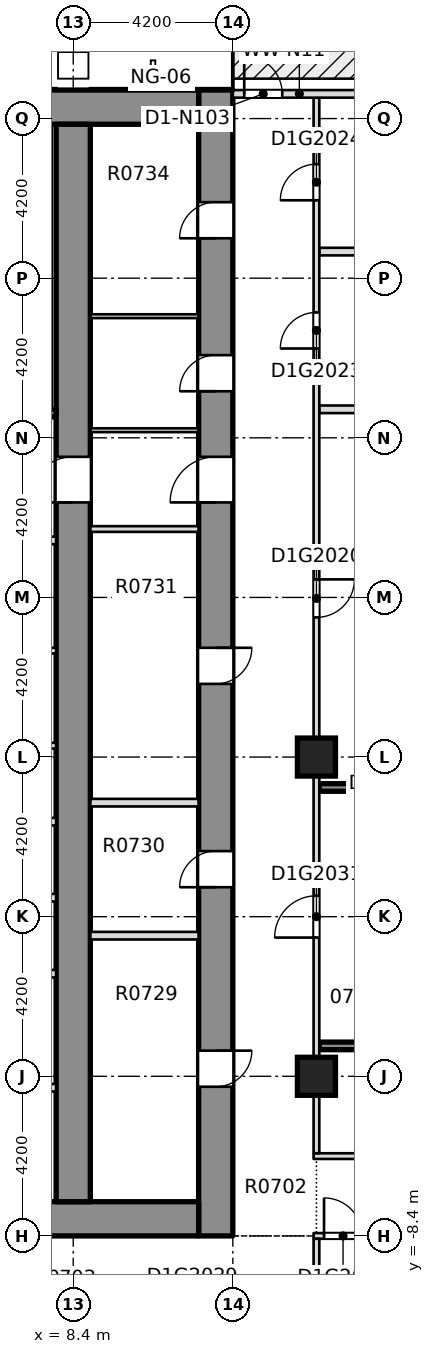
"""IFC4 building model, lengths in metres.
Left out: names, types, materials, properties, quantities, classifications, styles, units other than length and angle.
Written with IfcOpenShell. Run it as: python <this file> out.ifc"""

import sys

from ifc_helpers import new_model, si_unit, direction, frame, frame_2d, origin, origin_2d, place, context, subcontext, project, spatial, rectangle, extrude, element, fill, save


model = new_model("IFC4")
c1 = context("Model", 3, precision=1e-05, world=origin(), true_north=direction((0.0, 1.0)))
c2 = subcontext(c1, "Body", "Model", "MODEL_VIEW")
j1 = project(units=[si_unit("LENGTHUNIT", "METRE"), si_unit("PLANEANGLEUNIT", "RADIAN")], contexts=[c1])
p1 = place(None, origin())
s1 = spatial("IfcSite", under=j1, at=p1, CompositionType="ELEMENT")
p2 = place(p1, origin())
s2 = spatial("IfcBuilding", under=s1, at=p2, CompositionType="ELEMENT")
p3 = place(p2, frame((0.0, 0.0, 37.95)))
s3 = spatial("IfcBuildingStorey", under=s2, at=p3, CompositionType="ELEMENT", Elevation=37.95)
p4 = place(p3, frame((12.15, -8.4, -0.32), z_axis=(0.0, 0.0, 1.0), x_axis=(0.0, 1.0, 0.0)))
e1 = element("IfcWall", 1, at=p4, inside=s3, PredefinedType="SHEAR", context=c2, shape_type="SweptSolid", body=[
    extrude(rectangle(XDim=30.15, YDim=0.9, at=frame_2d((15.075, 0.0))), origin(), (0.0, 0.0, 1.0), 3.45),
])
p5 = place(p4, frame((3.925, 0.0, 0.32)))
e2 = element("IfcOpeningElement", 2, at=p5, cuts=e1, PredefinedType="OPENING", context=c2, shape_type="SweptSolid", body=[
    extrude(rectangle(XDim=0.95, YDim=2.1, at=frame_2d((0.475, 1.05))), frame((0.0, 0.46, 0.0), z_axis=(0.0, -1.0, 0.0), x_axis=(1.0, 0.0, 0.0)), (0.0, 0.0, 1.0), 0.92),
])
p6 = place(p4, frame((9.175, 0.0, 0.32)))
e3 = element("IfcOpeningElement", 3, at=p6, cuts=e1, PredefinedType="OPENING", context=c2, shape_type="SweptSolid", body=[
    extrude(rectangle(XDim=0.95, YDim=2.1, at=frame_2d((0.475, 1.05))), frame((0.0, 0.46, 0.0), z_axis=(0.0, -1.0, 0.0), x_axis=(1.0, 0.0, 0.0)), (0.0, 0.0, 1.0), 0.92),
])
p7 = place(p4, frame((14.525, 0.0, 0.32)))
e4 = element("IfcOpeningElement", 4, at=p7, cuts=e1, PredefinedType="OPENING", context=c2, shape_type="SweptSolid", body=[
    extrude(rectangle(XDim=0.95, YDim=2.1, at=frame_2d((0.475, 1.05))), frame((0.0, 0.46, 0.0), z_axis=(0.0, -1.0, 0.0), x_axis=(1.0, 0.0, 0.0)), (0.0, 0.0, 1.0), 0.92),
])
p8 = place(p4, frame((22.225, 0.0, 0.32)))
e5 = element("IfcOpeningElement", 5, at=p8, cuts=e1, PredefinedType="OPENING", context=c2, shape_type="SweptSolid", body=[
    extrude(rectangle(XDim=0.95, YDim=2.1, at=frame_2d((0.475, 1.05))), frame((0.0, 0.46, 0.0), z_axis=(0.0, -1.0, 0.0), x_axis=(1.0, 0.0, 0.0)), (0.0, 0.0, 1.0), 0.92),
])
p9 = place(p4, frame((26.25, 0.0, 0.32)))
e6 = element("IfcOpeningElement", 6, at=p9, cuts=e1, PredefinedType="OPENING", context=c2, shape_type="SweptSolid", body=[
    extrude(rectangle(XDim=0.95, YDim=2.1, at=frame_2d((0.475, 1.05))), frame((0.0, 0.46, 0.0), z_axis=(0.0, -1.0, 0.0), x_axis=(1.0, 0.0, 0.0)), (0.0, 0.0, 1.0), 0.92),
])
p10 = place(p4, frame((19.3, 0.0, 0.32)))
e7 = element("IfcOpeningElement", 7, at=p10, cuts=e1, PredefinedType="OPENING", context=c2, shape_type="SweptSolid", body=[
    extrude(rectangle(XDim=1.2, YDim=2.1, at=frame_2d((0.6, 1.05))), frame((0.0, 0.46, 0.0), z_axis=(0.0, -1.0, 0.0), x_axis=(1.0, 0.0, 0.0)), (0.0, 0.0, 1.0), 0.92),
])
p11 = place(p3, frame((-11.7, -7.95, -0.32), z_axis=(0.0, 0.0, 1.0), x_axis=(1.0, 0.0, 0.0)))
e8 = element("IfcWall", 8, at=p11, inside=s3, PredefinedType="SHEAR", context=c2, shape_type="SweptSolid", body=[
    extrude(rectangle(XDim=23.4, YDim=0.9, at=frame_2d((11.7, 0.0))), origin(), (0.0, 0.0, 1.0), 3.45),
])
p12 = place(p11, frame((6.95, 0.0, 0.32)))
e9 = element("IfcOpeningElement", 9, at=p12, cuts=e8, PredefinedType="OPENING", context=c2, shape_type="SweptSolid", body=[
    extrude(rectangle(XDim=1.8, YDim=2.1, at=frame_2d((0.9, 1.05))), frame((0.0, 0.46, 0.0), z_axis=(0.0, -1.0, 0.0), x_axis=(1.0, 0.0, 0.0)), (0.0, 0.0, 1.0), 0.92),
])
p13 = place(p11, frame((14.65, 0.0, 0.32)))
e10 = element("IfcOpeningElement", 10, at=p13, cuts=e8, PredefinedType="OPENING", context=c2, shape_type="SweptSolid", body=[
    extrude(rectangle(XDim=1.8, YDim=2.1, at=frame_2d((0.9, 1.05))), frame((0.0, 0.46, 0.0), z_axis=(0.0, -1.0, 0.0), x_axis=(1.0, 0.0, 0.0)), (0.0, 0.0, 1.0), 0.92),
])
p14 = place(p3, frame((-11.7, 21.3, -0.32), z_axis=(0.0, 0.0, 1.0), x_axis=(1.0, 0.0, 0.0)))
e11 = element("IfcWall", 11, at=p14, inside=s3, PredefinedType="SOLIDWALL", context=c2, shape_type="SweptSolid", body=[
    extrude(rectangle(XDim=23.4, YDim=0.9, at=frame_2d((11.7, 0.0))), origin(), (0.0, 0.0, 1.0), 3.45),
])
p15 = place(p3, frame((8.4, -7.5, -0.32), z_axis=(0.0, 0.0, 1.0), x_axis=(0.0, 1.0, 0.0)))
e12 = element("IfcWall", 12, at=p15, inside=s3, PredefinedType="SHEAR", context=c2, shape_type="SweptSolid", body=[
    extrude(rectangle(XDim=28.35, YDim=0.9, at=frame_2d((14.175, 0.0))), origin(), (0.0, 0.0, 1.0), 3.45),
])
p16 = place(p15, frame((18.4, 0.0, 0.32)))
e13 = element("IfcOpeningElement", 13, at=p16, cuts=e12, PredefinedType="OPENING", context=c2, shape_type="SweptSolid", body=[
    extrude(rectangle(XDim=1.2, YDim=2.1, at=frame_2d((0.6, 1.05))), frame((0.0, 0.46, 0.0), z_axis=(0.0, -1.0, 0.0), x_axis=(1.0, 0.0, 0.0)), (0.0, 0.0, 1.0), 0.92),
])
for number, where, z_axis, x_axis in (
    (14, (14.8, -4.2, -0.32), (0.0, 0.0, 1.0), (1.0, 0.0, 0.0)),
    (15, (14.8, 4.2, -0.32), (0.0, 0.0, 1.0), (1.0, 0.0, 0.0)),
):
    element("IfcColumn", number, at=place(p3, frame(where, z_axis=z_axis, x_axis=x_axis)), inside=s3, PredefinedType="COLUMN", context=c2, shape_type="SweptSolid", body=[
        extrude(rectangle(XDim=1.0, YDim=1.0, at=origin_2d()), origin(), (0.0, 0.0, 1.0), 3.45),
    ])
p17 = place(p3, frame((14.725, -8.4, 0.0), z_axis=(0.0, 0.0, 1.0), x_axis=(1.0, 0.0, 0.0)))
e16 = element("IfcWall", 16, at=p17, inside=s3, PredefinedType="PARTITIONING", context=c2, shape_type="SweptSolid", body=[
    extrude(rectangle(XDim=11.025, YDim=0.15, at=frame_2d((5.512, 0.0))), origin(), (0.0, 0.0, 1.0), 3.13),
])
p18 = place(p17, frame((0.275, 0.0, 0.0)))
e17 = element("IfcOpeningElement", 17, at=p18, cuts=e16, PredefinedType="OPENING", context=c2, shape_type="SweptSolid", body=[
    extrude(rectangle(XDim=1.0, YDim=2.1, at=frame_2d((0.5, 1.05))), frame((0.0, 0.085, 0.0), z_axis=(0.0, -1.0, 0.0), x_axis=(1.0, 0.0, 0.0)), (0.0, 0.0, 1.0), 0.17),
])
p19 = place(p3, frame((14.725, -6.3, 0.0), z_axis=(0.0, 0.0, 1.0), x_axis=(1.0, 0.0, 0.0)))
e18 = element("IfcWall", 18, at=p19, inside=s3, PredefinedType="PARTITIONING", context=c2, shape_type="SweptSolid", body=[
    extrude(rectangle(XDim=11.025, YDim=0.15, at=frame_2d((5.512, 0.0))), origin(), (0.0, 0.0, 1.0), 3.13),
])
p20 = place(p19, frame((5.15, 0.0, 0.0)))
e19 = element("IfcOpeningElement", 19, at=p20, cuts=e18, PredefinedType="OPENING", context=c2, shape_type="SweptSolid", body=[
    extrude(rectangle(XDim=1.0, YDim=2.1, at=frame_2d((0.5, 1.05))), frame((0.0, 0.085, 0.0), z_axis=(0.0, -1.0, 0.0), x_axis=(1.0, 0.0, 0.0)), (0.0, 0.0, 1.0), 0.17),
])
p21 = place(p3, frame((14.875, -3.4, 0.0), z_axis=(0.0, 0.0, 1.0), x_axis=(1.0, 0.0, 0.0)))
e20 = element("IfcWall", 20, at=p21, inside=s3, PredefinedType="SOLIDWALL", context=c2, shape_type="SweptSolid", body=[
    extrude(rectangle(XDim=5.525, YDim=0.2, at=frame_2d((2.762, 0.0))), origin(), (0.0, 0.0, 1.0), 3.13),
])
p22 = place(p3, frame((14.875, 3.4, 0.0), z_axis=(0.0, 0.0, 1.0), x_axis=(1.0, 0.0, 0.0)))
e21 = element("IfcWall", 21, at=p22, inside=s3, PredefinedType="SOLIDWALL", context=c2, shape_type="SweptSolid", body=[
    extrude(rectangle(XDim=5.575, YDim=0.2, at=frame_2d((2.788, 0.0))), origin(), (0.0, 0.0, 1.0), 3.13),
])
for number, where, z_axis, x_axis in (
    (22, (14.875, 13.35, 0.0), (0.0, 0.0, 1.0), (1.0, 0.0, 0.0)),
    (23, (14.875, 17.5, 0.0), (0.0, 0.0, 1.0), (1.0, 0.0, 0.0)),
):
    element("IfcWall", number, at=place(p3, frame(where, z_axis=z_axis, x_axis=x_axis)), inside=s3, PredefinedType="PARTITIONING", context=c2, shape_type="SweptSolid", body=[
        extrude(rectangle(XDim=2.475, YDim=0.2, at=frame_2d((1.238, 0.0))), origin(), (0.0, 0.0, 1.0), 3.13),
    ])
p23 = place(p3, frame((14.8, -10.525, 0.0), z_axis=(0.0, 0.0, 1.0), x_axis=(0.0, 1.0, 0.0)))
e24 = element("IfcWall", 24, at=p23, inside=s3, PredefinedType="PARTITIONING", context=c2, shape_type="SweptSolid", body=[
    extrude(rectangle(XDim=2.05, YDim=0.15, at=frame_2d((1.025, 0.0))), origin(), (0.0, 0.0, 1.0), 3.13),
])
p24 = place(p3, frame((14.8, -6.225, 0.0), z_axis=(0.0, 0.0, 1.0), x_axis=(0.0, 1.0, 0.0)))
e25 = element("IfcWall", 25, at=p24, inside=s3, PredefinedType="PARTITIONING", context=c2, shape_type="SweptSolid", body=[
    extrude(rectangle(XDim=27.775, YDim=0.15, at=frame_2d((13.888, 0.0))), origin(), (0.0, 0.0, 1.0), 3.13),
])
p25 = place(p24, frame((14.1, 0.0, 0.0)))
e26 = element("IfcOpeningElement", 26, at=p25, cuts=e25, PredefinedType="OPENING", context=c2, shape_type="SweptSolid", body=[
    extrude(rectangle(XDim=1.0, YDim=2.1, at=frame_2d((0.5, 1.05))), frame((0.0, 0.085, 0.0), z_axis=(0.0, -1.0, 0.0), x_axis=(1.0, 0.0, 0.0)), (0.0, 0.0, 1.0), 0.17),
])
p26 = place(p24, frame((21.175, 0.0, 0.0)))
e27 = element("IfcOpeningElement", 27, at=p26, cuts=e25, PredefinedType="OPENING", context=c2, shape_type="SweptSolid", body=[
    extrude(rectangle(XDim=0.95, YDim=2.1, at=frame_2d((0.475, 1.05))), frame((0.0, 0.085, 0.0), z_axis=(0.0, -1.0, 0.0), x_axis=(1.0, 0.0, 0.0)), (0.0, 0.0, 1.0), 0.17),
])
p27 = place(p24, frame((25.075, 0.0, 0.0)))
e28 = element("IfcOpeningElement", 28, at=p27, cuts=e25, PredefinedType="OPENING", context=c2, shape_type="SweptSolid", body=[
    extrude(rectangle(XDim=0.95, YDim=2.1, at=frame_2d((0.475, 1.05))), frame((0.0, 0.085, 0.0), z_axis=(0.0, -1.0, 0.0), x_axis=(1.0, 0.0, 0.0)), (0.0, 0.0, 1.0), 0.17),
])
p28 = place(p24, frame((5.675, 0.0, 0.0)))
e29 = element("IfcOpeningElement", 29, at=p28, cuts=e25, PredefinedType="OPENING", context=c2, shape_type="SweptSolid", body=[
    extrude(rectangle(XDim=1.1, YDim=2.1, at=frame_2d((0.55, 1.05))), frame((0.0, 0.085, 0.0), z_axis=(0.0, -1.0, 0.0), x_axis=(1.0, 0.0, 0.0)), (0.0, 0.0, 1.0), 0.17),
])
p29 = place(p3, frame((16.1, 21.65, 0.0), z_axis=(0.0, 0.0, 1.0), x_axis=(-1.0, 0.0, 0.0)))
e30 = element("IfcWall", 30, at=p29, inside=s3, PredefinedType="STANDARD", context=c2, shape_type="SweptSolid", body=[
    extrude(rectangle(XDim=3.5, YDim=0.2, at=frame_2d((1.75, 0.0))), origin(), (0.0, 0.0, 1.0), 3.13),
])
p30 = place(p29, frame((2.2, 0.0, 0.0)))
e31 = element("IfcOpeningElement", 31, at=p30, cuts=e30, PredefinedType="OPENING", context=c2, shape_type="SweptSolid", body=[
    extrude(rectangle(XDim=1.0, YDim=2.4, at=frame_2d((0.5, 1.2))), frame((0.0, 0.11, 0.0), z_axis=(0.0, -1.0, 0.0), x_axis=(1.0, 0.0, 0.0)), (0.0, 0.0, 1.0), 0.22),
])
for number, where, z_axis, x_axis in (
    (32, (5.575, -4.5, 0.0), (0.0, 0.0, 1.0), (1.0, 0.0, 0.0)),
    (33, (5.575, -1.5, 0.0), (0.0, 0.0, 1.0), (1.0, 0.0, 0.0)),
    (34, (5.575, 0.5, 0.0), (0.0, 0.0, 1.0), (1.0, 0.0, 0.0)),
    (35, (5.575, 2.5, 0.0), (0.0, 0.0, 1.0), (1.0, 0.0, 0.0)),
):
    element("IfcWall", number, at=place(p3, frame(where, z_axis=z_axis, x_axis=x_axis)), inside=s3, PredefinedType="PARTITIONING", context=c2, shape_type="SweptSolid", body=[
        extrude(rectangle(XDim=2.374, YDim=0.2, at=frame_2d((1.187, 0.0))), origin(), (0.0, 0.0, 1.0), 3.13),
    ])
p31 = place(p3, frame((5.425, 4.5, 0.0), z_axis=(0.0, 0.0, 1.0), x_axis=(1.0, 0.0, 0.0)))
e36 = element("IfcWall", 36, at=p31, inside=s3, PredefinedType="PARTITIONING", context=c2, shape_type="SweptSolid", body=[
    extrude(rectangle(XDim=2.524, YDim=0.15, at=frame_2d((1.262, 0.0))), origin(), (0.0, 0.0, 1.0), 3.13),
])
p32 = place(p3, frame((-7.949, 7.0, 0.0), z_axis=(0.0, 0.0, 1.0), x_axis=(1.0, 0.0, 0.0)))
e37 = element("IfcWall", 37, at=p32, inside=s3, PredefinedType="PARTITIONING", context=c2, shape_type="SweptSolid", body=[
    extrude(rectangle(XDim=15.898, YDim=0.15, at=frame_2d((7.949, 0.0))), origin(), (0.0, 0.0, 1.0), 3.13),
])
p33 = place(p32, frame((7.249, 0.0, 0.0)))
e38 = element("IfcOpeningElement", 38, at=p33, cuts=e37, PredefinedType="OPENING", context=c2, shape_type="SweptSolid", body=[
    extrude(rectangle(XDim=1.4, YDim=2.1, at=frame_2d((0.7, 1.05))), frame((0.0, 0.085, 0.0), z_axis=(0.0, -1.0, 0.0), x_axis=(1.0, 0.0, 0.0)), (0.0, 0.0, 1.0), 0.17),
])
p34 = place(p3, frame((3.6, 9.9, 0.0), z_axis=(0.0, 0.0, 1.0), x_axis=(1.0, 0.0, 0.0)))
e39 = element("IfcWall", 39, at=p34, inside=s3, PredefinedType="PARTITIONING", context=c2, shape_type="SweptSolid", body=[
    extrude(rectangle(XDim=4.349, YDim=0.2, at=frame_2d((2.174, 0.0))), origin(), (0.0, 0.0, 1.0), 3.13),
])
p35 = place(p34, frame((2.25, 0.0, 0.0)))
e40 = element("IfcOpeningElement", 40, at=p35, cuts=e39, PredefinedType="OPENING", context=c2, shape_type="SweptSolid", body=[
    extrude(rectangle(XDim=1.1, YDim=2.1, at=frame_2d((0.55, 1.05))), frame((0.0, 0.11, 0.0), z_axis=(0.0, -1.0, 0.0), x_axis=(1.0, 0.0, 0.0)), (0.0, 0.0, 1.0), 0.22),
])
p36 = place(p3, frame((3.425, 13.25, 0.0), z_axis=(0.0, 0.0, 1.0), x_axis=(1.0, 0.0, 0.0)))
e41 = element("IfcWall", 41, at=p36, inside=s3, PredefinedType="SOLIDWALL", context=c2, shape_type="SweptSolid", body=[
    extrude(rectangle(XDim=4.524, YDim=0.2, at=frame_2d((2.262, 0.0))), origin(), (0.0, 0.0, 1.0), 3.13),
])
p37 = place(p36, frame((1.825, 0.0, 0.0)))
e42 = element("IfcOpeningElement", 42, at=p37, cuts=e41, PredefinedType="OPENING", context=c2, shape_type="SweptSolid", body=[
    extrude(rectangle(XDim=1.2, YDim=2.1, at=frame_2d((0.6, 1.05))), frame((0.0, 0.11, 0.0), z_axis=(0.0, -1.0, 0.0), x_axis=(1.0, 0.0, 0.0)), (0.0, 0.0, 1.0), 0.22),
])
for number, where, z_axis, x_axis in (
    (43, (8.851, -0.5, 0.0), (0.0, 0.0, 1.0), (1.0, 0.0, 0.0)),
    (44, (8.851, 3.0, 0.0), (0.0, 0.0, 1.0), (1.0, 0.0, 0.0)),
):
    element("IfcWall", number, at=place(p3, frame(where, z_axis=z_axis, x_axis=x_axis)), inside=s3, PredefinedType="PARTITIONING", context=c2, shape_type="SweptSolid", body=[
        extrude(rectangle(XDim=2.848, YDim=0.2, at=frame_2d((1.424, 0.0))), origin(), (0.0, 0.0, 1.0), 3.13),
    ])
p38 = place(p3, frame((8.851, 10.2, 0.0), z_axis=(0.0, 0.0, 1.0), x_axis=(1.0, 0.0, 0.0)))
e45 = element("IfcWall", 45, at=p38, inside=s3, PredefinedType="PARTITIONING", context=c2, shape_type="SweptSolid", body=[
    extrude(rectangle(XDim=2.848, YDim=0.15, at=frame_2d((1.424, 0.0))), origin(), (0.0, 0.0, 1.0), 3.13),
])
for number, where, z_axis, x_axis in (
    (46, (8.851, 12.8, 0.0), (0.0, 0.0, 1.0), (1.0, 0.0, 0.0)),
    (47, (8.851, 15.8, 0.0), (0.0, 0.0, 1.0), (1.0, 0.0, 0.0)),
):
    element("IfcWall", number, at=place(p3, frame(where, z_axis=z_axis, x_axis=x_axis)), inside=s3, PredefinedType="PARTITIONING", context=c2, shape_type="SweptSolid", body=[
        extrude(rectangle(XDim=2.848, YDim=0.1, at=frame_2d((1.424, 0.0))), origin(), (0.0, 0.0, 1.0), 3.13),
    ])
p39 = place(p18, origin())
e48 = element("IfcDoor", 48, at=p39, inside=s3, OperationType="SINGLE_SWING_RIGHT", PredefinedType="DOOR", context=c2, shape_type="SweptSolid", body=[
    extrude(rectangle(XDim=1.0, YDim=2.1, at=frame_2d((0.5, 1.05))), frame((0.0, 0.025, 0.0), z_axis=(0.0, -1.0, 0.0), x_axis=(1.0, 0.0, 0.0)), (0.0, 0.0, 1.0), 0.05),
])
fill(e17, e48)
p40 = place(p25, origin())
e49 = element("IfcDoor", 49, at=p40, inside=s3, OperationType="SINGLE_SWING_RIGHT", PredefinedType="DOOR", context=c2, shape_type="SweptSolid", body=[
    extrude(rectangle(XDim=1.0, YDim=2.1, at=frame_2d((0.5, 1.05))), frame((0.0, 0.025, 0.0), z_axis=(0.0, -1.0, 0.0), x_axis=(1.0, 0.0, 0.0)), (0.0, 0.0, 1.0), 0.05),
])
fill(e26, e49)
p41 = place(p26, origin())
e50 = element("IfcDoor", 50, at=p41, inside=s3, OperationType="SINGLE_SWING_LEFT", PredefinedType="DOOR", context=c2, shape_type="SweptSolid", body=[
    extrude(rectangle(XDim=0.95, YDim=2.1, at=frame_2d((0.475, 1.05))), frame((0.0, 0.025, 0.0), z_axis=(0.0, -1.0, 0.0), x_axis=(1.0, 0.0, 0.0)), (0.0, 0.0, 1.0), 0.05),
])
fill(e27, e50)
p42 = place(p27, origin())
e51 = element("IfcDoor", 51, at=p42, inside=s3, OperationType="SINGLE_SWING_RIGHT", PredefinedType="DOOR", context=c2, shape_type="SweptSolid", body=[
    extrude(rectangle(XDim=0.95, YDim=2.1, at=frame_2d((0.475, 1.05))), frame((0.0, 0.025, 0.0), z_axis=(0.0, -1.0, 0.0), x_axis=(1.0, 0.0, 0.0)), (0.0, 0.0, 1.0), 0.05),
])
fill(e28, e51)
p43 = place(p28, origin())
e52 = element("IfcDoor", 52, at=p43, inside=s3, OperationType="SINGLE_SWING_LEFT", PredefinedType="DOOR", context=c2, shape_type="SweptSolid", body=[
    extrude(rectangle(XDim=1.1, YDim=2.1, at=frame_2d((0.55, 1.05))), frame((0.0, 0.025, 0.0), z_axis=(0.0, -1.0, 0.0), x_axis=(1.0, 0.0, 0.0)), (0.0, 0.0, 1.0), 0.05),
])
fill(e29, e52)
p44 = place(p30, origin())
e53 = element("IfcDoor", 53, at=p44, inside=s3, OperationType="SINGLE_SWING_LEFT", PredefinedType="DOOR", context=c2, shape_type="SweptSolid", body=[
    extrude(rectangle(XDim=1.0, YDim=2.4, at=frame_2d((0.5, 1.2))), frame((0.0, 0.025, 0.0), z_axis=(0.0, -1.0, 0.0), x_axis=(1.0, 0.0, 0.0)), (0.0, 0.0, 1.0), 0.05),
])
fill(e31, e53)
p45 = place(p5, origin())
e54 = element("IfcDoor", 54, at=p45, inside=s3, OperationType="SINGLE_SWING_LEFT", PredefinedType="DOOR", context=c2, shape_type="SweptSolid", body=[
    extrude(rectangle(XDim=0.95, YDim=2.1, at=frame_2d((0.475, 1.05))), frame((0.0, 0.025, 0.0), z_axis=(0.0, -1.0, 0.0), x_axis=(1.0, 0.0, 0.0)), (0.0, 0.0, 1.0), 0.05),
])
fill(e2, e54)
p46 = place(p6, origin())
e55 = element("IfcDoor", 55, at=p46, inside=s3, OperationType="SINGLE_SWING_LEFT", PredefinedType="DOOR", context=c2, shape_type="SweptSolid", body=[
    extrude(rectangle(XDim=0.95, YDim=2.1, at=frame_2d((0.475, 1.05))), frame((0.0, 0.025, 0.0), z_axis=(0.0, -1.0, 0.0), x_axis=(1.0, 0.0, 0.0)), (0.0, 0.0, 1.0), 0.05),
])
fill(e3, e55)
p47 = place(p7, origin())
e56 = element("IfcDoor", 56, at=p47, inside=s3, OperationType="SINGLE_SWING_LEFT", PredefinedType="DOOR", context=c2, shape_type="SweptSolid", body=[
    extrude(rectangle(XDim=0.95, YDim=2.1, at=frame_2d((0.475, 1.05))), frame((0.0, 0.025, 0.0), z_axis=(0.0, -1.0, 0.0), x_axis=(1.0, 0.0, 0.0)), (0.0, 0.0, 1.0), 0.05),
])
fill(e4, e56)
p48 = place(p8, origin())
e57 = element("IfcDoor", 57, at=p48, inside=s3, OperationType="SINGLE_SWING_LEFT", PredefinedType="DOOR", context=c2, shape_type="SweptSolid", body=[
    extrude(rectangle(XDim=0.95, YDim=2.1, at=frame_2d((0.475, 1.05))), frame((0.0, 0.025, 0.0), z_axis=(0.0, -1.0, 0.0), x_axis=(1.0, 0.0, 0.0)), (0.0, 0.0, 1.0), 0.05),
])
fill(e5, e57)
p49 = place(p9, origin())
e58 = element("IfcDoor", 58, at=p49, inside=s3, OperationType="SINGLE_SWING_LEFT", PredefinedType="DOOR", context=c2, shape_type="SweptSolid", body=[
    extrude(rectangle(XDim=0.95, YDim=2.1, at=frame_2d((0.475, 1.05))), frame((0.0, 0.025, 0.0), z_axis=(0.0, -1.0, 0.0), x_axis=(1.0, 0.0, 0.0)), (0.0, 0.0, 1.0), 0.05),
])
fill(e6, e58)
p50 = place(p10, origin())
e59 = element("IfcDoor", 59, at=p50, inside=s3, OperationType="SINGLE_SWING_LEFT", PredefinedType="DOOR", context=c2, shape_type="SweptSolid", body=[
    extrude(rectangle(XDim=1.2, YDim=2.1, at=frame_2d((0.6, 1.05))), frame((0.0, 0.025, 0.0), z_axis=(0.0, -1.0, 0.0), x_axis=(1.0, 0.0, 0.0)), (0.0, 0.0, 1.0), 0.05),
])
fill(e7, e59)
p51 = place(p16, origin())
e60 = element("IfcDoor", 60, at=p51, inside=s3, OperationType="SINGLE_SWING_LEFT", PredefinedType="DOOR", context=c2, shape_type="SweptSolid", body=[
    extrude(rectangle(XDim=1.2, YDim=2.1, at=frame_2d((0.6, 1.05))), frame((0.0, 0.025, 0.0), z_axis=(0.0, -1.0, 0.0), x_axis=(1.0, 0.0, 0.0)), (0.0, 0.0, 1.0), 0.05),
])
fill(e13, e60)
save(model, sys.argv[1])
